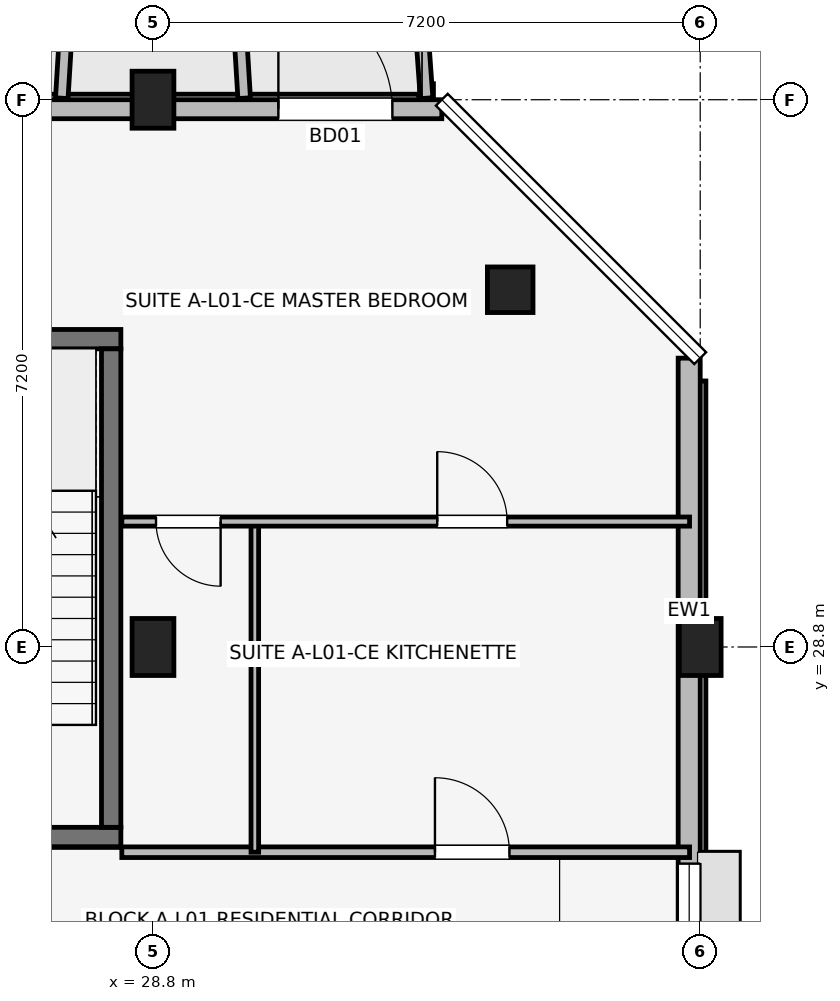
"""IFC4 building model, lengths in metres.
Left out: names, types, materials, properties, quantities, classifications, styles, units other than length and angle.
Written with IfcOpenShell. Run it as: python <this file> out.ifc"""

import sys

from ifc_helpers import new_model, si_unit, direction, frame, frame_2d, origin, origin_2d, place, context, subcontext, project, spatial, rectangle, extrude, element, fill, save


model = new_model("IFC4")
c1 = context("Model", 3, precision=1e-05, world=origin(), true_north=direction((0.0, 1.0)))
c2 = subcontext(c1, "Body", "Model", "MODEL_VIEW")
j1 = project(units=[si_unit("LENGTHUNIT", "METRE"), si_unit("PLANEANGLEUNIT", "RADIAN")], contexts=[c1])
p1 = place(None, origin())
s1 = spatial("IfcSite", under=j1, at=p1, CompositionType="ELEMENT")
p2 = place(p1, origin())
s2 = spatial("IfcBuilding", under=s1, at=p2, CompositionType="ELEMENT")
p3 = place(p2, frame((0.0, 0.0, 4.5)))
s3 = spatial("IfcBuildingStorey", under=s2, at=p3, CompositionType="ELEMENT", Elevation=4.5)
for number, where, z_axis, x_axis in (
    (1, (28.8, 28.8, 0.0), (0.0, 0.0, 1.0), (1.0, 0.0, 0.0)),
    (2, (28.8, 36.0, 0.0), (0.0, 0.0, 1.0), (1.0, 0.0, 0.0)),
    (3, (36.0, 28.8, 0.0), (0.0, 0.0, 1.0), (1.0, 0.0, 0.0)),
):
    element("IfcColumn", number, at=place(p3, frame(where, z_axis=z_axis, x_axis=x_axis)), inside=s3, PredefinedType="COLUMN", context=c2, shape_type="SweptSolid", body=[
        extrude(rectangle(XDim=0.55, YDim=0.75, at=origin_2d()), origin(), (0.0, 0.0, 1.0), 4.2),
    ])
p4 = place(p3, frame((33.5, 33.5, 0.0), z_axis=(0.0, 0.0, 1.0), x_axis=(1.0, 0.0, 0.0)))
e4 = element("IfcColumn", 4, at=p4, inside=s3, PredefinedType="COLUMN", context=c2, shape_type="SweptSolid", body=[
    extrude(rectangle(XDim=0.6, YDim=0.6, at=origin_2d()), origin(), (0.0, 0.0, 1.0), 4.2),
])
p5 = place(p3, frame((25.073, 26.3, 0.0), z_axis=(0.0, 0.0, 1.0), x_axis=(1.0, 0.0, 0.0)))
e5 = element("IfcWall", 5, at=p5, inside=s3, PredefinedType="SHEAR", context=c2, shape_type="SweptSolid", body=[
    extrude(rectangle(XDim=3.305, YDim=0.255, at=frame_2d((1.652, 0.0))), origin(), (0.0, 0.0, 1.0), 4.2),
])
p6 = place(p5, frame((1.127, 0.0, 0.0)))
e6 = element("IfcOpeningElement", 6, at=p6, cuts=e5, PredefinedType="OPENING", context=c2, shape_type="SweptSolid", body=[
    extrude(rectangle(XDim=1.05, YDim=2.12, at=frame_2d((0.525, 1.06))), frame((0.0, 0.137, 0.0), z_axis=(0.0, -1.0, 0.0), x_axis=(1.0, 0.0, 0.0)), (0.0, 0.0, 1.0), 0.275),
])
p7 = place(p3, frame((25.073, 32.85, 0.0), z_axis=(0.0, 0.0, 1.0), x_axis=(1.0, 0.0, 0.0)))
e7 = element("IfcWall", 7, at=p7, inside=s3, PredefinedType="SHEAR", context=c2, shape_type="SweptSolid", body=[
    extrude(rectangle(XDim=3.305, YDim=0.255, at=frame_2d((1.652, 0.0))), origin(), (0.0, 0.0, 1.0), 4.2),
])
p8 = place(p3, frame((28.25, 26.427, 0.0), z_axis=(0.0, 0.0, 1.0), x_axis=(0.0, 1.0, 0.0)))
e8 = element("IfcWall", 8, at=p8, inside=s3, PredefinedType="SHEAR", context=c2, shape_type="SweptSolid", body=[
    extrude(rectangle(XDim=6.295, YDim=0.255, at=frame_2d((3.147, 0.0))), origin(), (0.0, 0.0, 1.0), 4.2),
])
p9 = place(p3, frame((35.855, 17.8, 0.0), z_axis=(0.0, 0.0, 1.0), x_axis=(0.0, 1.0, 0.0)))
e9 = element("IfcWall", 9, at=p9, inside=s3, PredefinedType="SOLIDWALL", context=c2, shape_type="SweptSolid", body=[
    extrude(rectangle(XDim=14.8, YDim=0.29, at=frame_2d((7.4, 0.0))), origin(), (0.0, 0.0, 1.0), 3.43),
])
p10 = place(p9, frame((6.65, 0.0, 1.05)))
e10 = element("IfcOpeningElement", 10, at=p10, cuts=e9, PredefinedType="OPENING", context=c2, shape_type="SweptSolid", body=[
    extrude(rectangle(XDim=1.5, YDim=1.15, at=frame_2d((0.75, 0.575))), frame((0.0, 0.155, 0.0), z_axis=(0.0, -1.0, 0.0), x_axis=(1.0, 0.0, 0.0)), (0.0, 0.0, 1.0), 0.31),
])
p11 = place(p9, frame((0.84, 0.0, 0.75)))
e11 = element("IfcOpeningElement", 11, at=p11, cuts=e9, PredefinedType="OPENING", context=c2, shape_type="SweptSolid", body=[
    extrude(rectangle(XDim=1.3, YDim=1.55, at=frame_2d((0.65, 0.775))), frame((0.0, 0.155, 0.0), z_axis=(0.0, -1.0, 0.0), x_axis=(1.0, 0.0, 0.0)), (0.0, 0.0, 1.0), 0.31),
])
p12 = place(p3, frame((32.6, 35.875, 0.0), z_axis=(0.0, 0.0, 1.0), x_axis=(-1.0, 0.0, 0.0)))
e12 = element("IfcWall", 12, at=p12, inside=s3, PredefinedType="SOLIDWALL", context=c2, shape_type="SweptSolid", body=[
    extrude(rectangle(XDim=29.2, YDim=0.25, at=frame_2d((14.6, 0.0))), origin(), (0.0, 0.0, 1.0), 3.48),
])
p13 = place(p12, frame((28.7, 0.0, 0.0), z_axis=(0.0, 0.0, 1.0), x_axis=(-1.0, 0.0, 0.0)))
e13 = element("IfcOpeningElement", 13, at=p13, cuts=e12, PredefinedType="OPENING", context=c2, shape_type="SweptSolid", body=[
    extrude(rectangle(XDim=1.8, YDim=2.15, at=frame_2d((0.9, 1.075))), frame((0.0, 0.135, 0.0), z_axis=(0.0, -1.0, 0.0), x_axis=(1.0, 0.0, 0.0)), (0.0, 0.0, 1.0), 0.27),
])
p14 = place(p12, frame((2.15, 0.0, 0.0), z_axis=(0.0, 0.0, 1.0), x_axis=(-1.0, 0.0, 0.0)))
e14 = element("IfcOpeningElement", 14, at=p14, cuts=e12, PredefinedType="OPENING", context=c2, shape_type="SweptSolid", body=[
    extrude(rectangle(XDim=1.5, YDim=2.15, at=frame_2d((0.75, 1.075))), frame((0.0, 0.135, 0.0), z_axis=(0.0, -1.0, 0.0), x_axis=(1.0, 0.0, 0.0)), (0.0, 0.0, 1.0), 0.27),
])
p15 = place(p12, frame((14.955, 0.0, 0.5)))
e15 = element("IfcOpeningElement", 15, at=p15, cuts=e12, PredefinedType="OPENING", context=c2, shape_type="SweptSolid", body=[
    extrude(rectangle(XDim=0.9, YDim=1.8, at=frame_2d((0.45, 0.9))), frame((0.0, 0.135, 0.0), z_axis=(0.0, -1.0, 0.0), x_axis=(1.0, 0.0, 0.0)), (0.0, 0.0, 1.0), 0.27),
])
p16 = place(p12, frame((7.675, 0.0, 0.7)))
e16 = element("IfcOpeningElement", 16, at=p16, cuts=e12, PredefinedType="OPENING", context=c2, shape_type="SweptSolid", body=[
    extrude(rectangle(XDim=2.0, YDim=1.65, at=frame_2d((1.0, 0.825))), frame((0.0, 0.135, 0.0), z_axis=(0.0, -1.0, 0.0), x_axis=(1.0, 0.0, 0.0)), (0.0, 0.0, 1.0), 0.27),
])
p17 = place(p12, frame((19.57, 0.0, 0.7)))
e17 = element("IfcOpeningElement", 17, at=p17, cuts=e12, PredefinedType="OPENING", context=c2, shape_type="SweptSolid", body=[
    extrude(rectangle(XDim=1.86, YDim=1.6, at=frame_2d((0.93, 0.8))), frame((0.0, 0.135, 0.0), z_axis=(0.0, -1.0, 0.0), x_axis=(1.0, 0.0, 0.0)), (0.0, 0.0, 1.0), 0.27),
])
p18 = place(p3, frame((27.6, 36.02, 0.0), z_axis=(0.0, 0.0, 1.0), x_axis=(0.061046865508, 0.998134900808, 0.0)))
e18 = element("IfcWall", 18, at=p18, inside=s3, PredefinedType="ELEMENTEDWALL", context=c2, shape_type="SweptSolid", body=[
    extrude(rectangle(XDim=1.964, YDim=0.165, at=frame_2d((0.982, 0.0))), origin(), (0.0, 0.0, 1.0), 3.63),
])
p19 = place(p3, frame((30.0, 36.02, 0.0), z_axis=(0.0, 0.0, 1.0), x_axis=(-0.061170732449, 0.998127317276, 0.0)))
e19 = element("IfcWall", 19, at=p19, inside=s3, PredefinedType="ELEMENTEDWALL", context=c2, shape_type="SweptSolid", body=[
    extrude(rectangle(XDim=1.964, YDim=0.165, at=frame_2d((0.982, 0.0))), origin(), (0.0, 0.0, 1.0), 4.0),
])
p20 = place(p3, frame((32.4, 36.02, 0.0), z_axis=(0.0, 0.0, 1.0), x_axis=(-0.071194071069, 0.997462482625, 0.0)))
e20 = element("IfcWall", 20, at=p20, inside=s3, PredefinedType="ELEMENTEDWALL", context=c2, shape_type="SweptSolid", body=[
    extrude(rectangle(XDim=1.965, YDim=0.165, at=frame_2d((0.982, 0.0))), origin(), (0.0, 0.0, 1.0), 4.0),
])
p21 = place(p3, frame((28.39, 26.1, 0.0), z_axis=(0.0, 0.0, 1.0), x_axis=(1.0, 0.0, 0.0)))
e21 = element("IfcWall", 21, at=p21, inside=s3, PredefinedType="PARTITIONING", context=c2, shape_type="SweptSolid", body=[
    extrude(rectangle(XDim=7.47, YDim=0.14, at=frame_2d((3.735, 0.0))), origin(), (0.0, 0.0, 1.0), 3.25),
])
p22 = place(p21, frame((4.12, 0.0, 0.0)))
e22 = element("IfcOpeningElement", 22, at=p22, cuts=e21, PredefinedType="OPENING", context=c2, shape_type="SweptSolid", body=[
    extrude(rectangle(XDim=0.98, YDim=2.1, at=frame_2d((0.49, 1.05))), frame((0.0, 0.08, 0.0), z_axis=(0.0, -1.0, 0.0), x_axis=(1.0, 0.0, 0.0)), (0.0, 0.0, 1.0), 0.16),
])
p23 = place(p3, frame((30.14, 26.1, 0.0), z_axis=(0.0, 0.0, 1.0), x_axis=(0.0, 1.0, 0.0)))
e23 = element("IfcWall", 23, at=p23, inside=s3, PredefinedType="PARTITIONING", context=c2, shape_type="SweptSolid", body=[
    extrude(rectangle(XDim=4.35, YDim=0.1, at=frame_2d((2.175, 0.0))), origin(), (0.0, 0.0, 1.0), 3.25),
])
p24 = place(p3, frame((28.39, 30.45, 0.0), z_axis=(0.0, 0.0, 1.0), x_axis=(1.0, 0.0, 0.0)))
e24 = element("IfcWall", 24, at=p24, inside=s3, PredefinedType="PARTITIONING", context=c2, shape_type="SweptSolid", body=[
    extrude(rectangle(XDim=7.47, YDim=0.12, at=frame_2d((3.735, 0.0))), origin(), (0.0, 0.0, 1.0), 3.25),
])
p25 = place(p24, frame((1.3, 0.0, 0.0), z_axis=(0.0, 0.0, 1.0), x_axis=(-1.0, 0.0, 0.0)))
e25 = element("IfcOpeningElement", 25, at=p25, cuts=e24, PredefinedType="OPENING", context=c2, shape_type="SweptSolid", body=[
    extrude(rectangle(XDim=0.85, YDim=2.08, at=frame_2d((0.425, 1.04))), frame((0.0, 0.07, 0.0), z_axis=(0.0, -1.0, 0.0), x_axis=(1.0, 0.0, 0.0)), (0.0, 0.0, 1.0), 0.14),
])
p26 = place(p24, frame((4.15, 0.0, 0.0)))
e26 = element("IfcOpeningElement", 26, at=p26, cuts=e24, PredefinedType="OPENING", context=c2, shape_type="SweptSolid", body=[
    extrude(rectangle(XDim=0.92, YDim=2.08, at=frame_2d((0.46, 1.04))), frame((0.0, 0.07, 0.0), z_axis=(0.0, -1.0, 0.0), x_axis=(1.0, 0.0, 0.0)), (0.0, 0.0, 1.0), 0.14),
])
p27 = place(p14, origin())
e27 = element("IfcDoor", 27, at=p27, inside=s3, OperationType="SINGLE_SWING_RIGHT", PredefinedType="DOOR", context=c2, shape_type="SweptSolid", body=[
    extrude(rectangle(XDim=1.5, YDim=2.15, at=frame_2d((0.75, 1.075))), frame((0.0, 0.025, 0.0), z_axis=(0.0, -1.0, 0.0), x_axis=(1.0, 0.0, 0.0)), (0.0, 0.0, 1.0), 0.05),
])
fill(e14, e27)
p28 = place(p10, origin())
e28 = element("IfcWindow", 28, at=p28, inside=s3, PartitioningType="SINGLE_PANEL", PredefinedType="WINDOW", context=c2, shape_type="SweptSolid", body=[
    extrude(rectangle(XDim=1.5, YDim=1.15, at=frame_2d((0.75, 0.575))), frame((0.0, 0.03, 0.0), z_axis=(0.0, -1.0, 0.0), x_axis=(1.0, 0.0, 0.0)), (0.0, 0.0, 1.0), 0.06),
])
fill(e10, e28)
p29 = place(p22, origin())
e29 = element("IfcDoor", 29, at=p29, inside=s3, OperationType="SINGLE_SWING_LEFT", PredefinedType="DOOR", context=c2, shape_type="SweptSolid", body=[
    extrude(rectangle(XDim=0.98, YDim=2.1, at=frame_2d((0.49, 1.05))), frame((0.0, 0.025, 0.0), z_axis=(0.0, -1.0, 0.0), x_axis=(1.0, 0.0, 0.0)), (0.0, 0.0, 1.0), 0.05),
])
fill(e22, e29)
p30 = place(p25, origin())
e30 = element("IfcDoor", 30, at=p30, inside=s3, OperationType="SINGLE_SWING_RIGHT", PredefinedType="DOOR", context=c2, shape_type="SweptSolid", body=[
    extrude(rectangle(XDim=0.85, YDim=2.08, at=frame_2d((0.425, 1.04))), frame((0.0, 0.025, 0.0), z_axis=(0.0, -1.0, 0.0), x_axis=(1.0, 0.0, 0.0)), (0.0, 0.0, 1.0), 0.05),
])
fill(e25, e30)
p31 = place(p26, origin())
e31 = element("IfcDoor", 31, at=p31, inside=s3, OperationType="SINGLE_SWING_LEFT", PredefinedType="DOOR", context=c2, shape_type="SweptSolid", body=[
    extrude(rectangle(XDim=0.92, YDim=2.08, at=frame_2d((0.46, 1.04))), frame((0.0, 0.025, 0.0), z_axis=(0.0, -1.0, 0.0), x_axis=(1.0, 0.0, 0.0)), (0.0, 0.0, 1.0), 0.05),
])
fill(e26, e31)
save(model, sys.argv[1])
